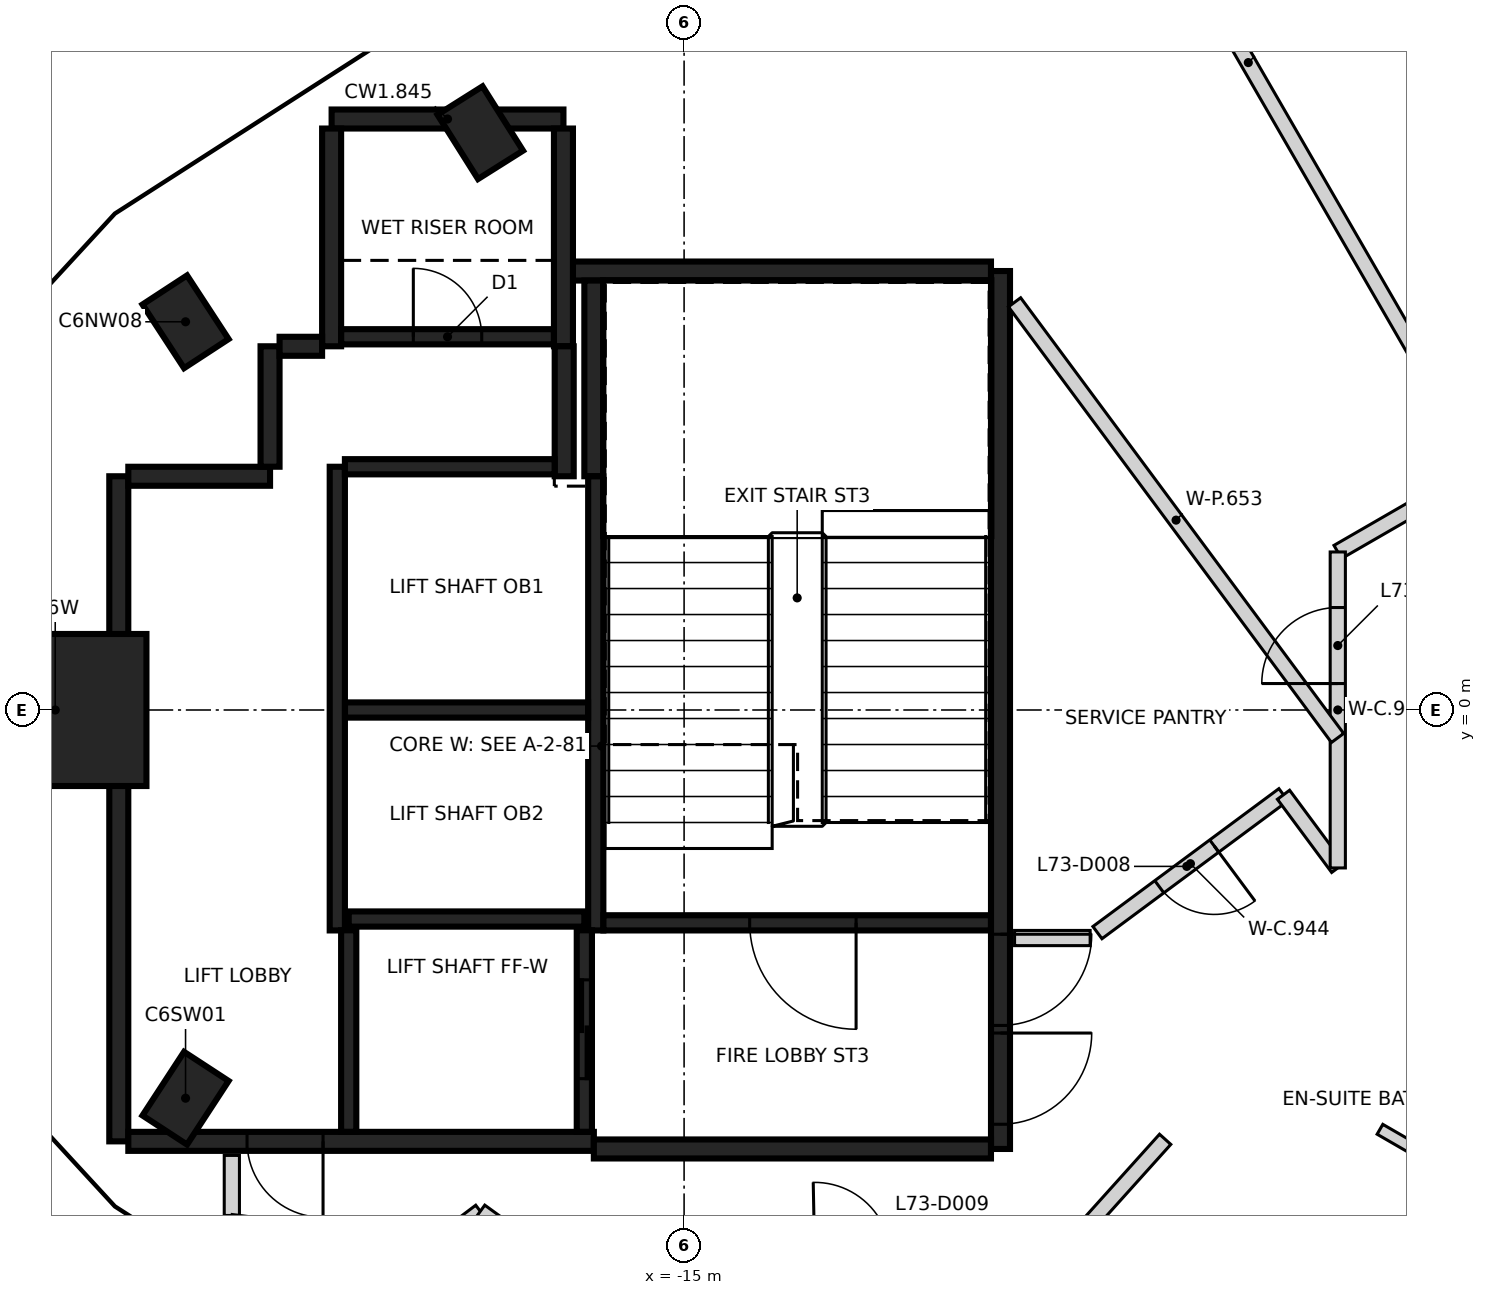
"""IFC4 building model, lengths in metres.
Left out: names, types, materials, properties, quantities, classifications, styles, units other than length and angle.
Written with IfcOpenShell. Run it as: python <this file> out.ifc"""

import sys

from ifc_helpers import new_model, si_unit, direction, frame, frame_2d, origin, origin_2d, place, context, subcontext, project, spatial, rectangle, extrude, element, fill, save


model = new_model("IFC4")
c1 = context("Model", 3, precision=1e-05, world=origin(), true_north=direction((0.0, 1.0)))
c2 = subcontext(c1, "Body", "Model", "MODEL_VIEW")
j1 = project(units=[si_unit("LENGTHUNIT", "METRE"), si_unit("PLANEANGLEUNIT", "RADIAN")], contexts=[c1])
p1 = place(None, origin())
s1 = spatial("IfcSite", under=j1, at=p1, CompositionType="ELEMENT")
p2 = place(p1, origin())
s2 = spatial("IfcBuilding", under=s1, at=p2, CompositionType="ELEMENT")
p3 = place(p2, frame((0.0, 0.0, 291.0)))
s3 = spatial("IfcBuildingStorey", under=s2, at=p3, CompositionType="ELEMENT", Elevation=291.0)
for number, where, z_axis, x_axis in (
    (1, (-17.681, 7.595, -0.35), (0.0, 0.0, 1.0), (-0.533, 0.846, 0.0)),
    (2, (-21.559, 5.107, -0.35), (0.0, 0.0, 1.0), (-0.547, 0.837, 0.0)),
    (3, (-21.559, -5.107, -0.35), (0.0, 0.0, 1.0), (0.547, 0.837, 0.0)),
):
    element("IfcColumn", number, at=place(p3, frame(where, z_axis=z_axis, x_axis=x_axis)), inside=s3, PredefinedType="COLUMN", context=c2, shape_type="SweptSolid", body=[
        extrude(rectangle(XDim=1.0, YDim=0.7, at=origin_2d()), origin(), (0.0, 0.0, 1.0), 3.6),
    ])
p4 = place(p3, frame((-23.273, 0.0, -0.35), z_axis=(0.0, 0.0, 1.0), x_axis=(1.0, 0.0, 0.0)))
e4 = element("IfcColumn", 4, at=p4, inside=s3, PredefinedType="COLUMN", context=c2, shape_type="SweptSolid", body=[
    extrude(rectangle(XDim=2.4, YDim=2.0, at=origin_2d()), origin(), (0.0, 0.0, 1.0), 3.6),
])
p5 = place(p3, frame((-10.837, 5.775, 0.0), z_axis=(0.0, 0.0, 1.0), x_axis=(0.0, -1.0, 0.0)))
e5 = element("IfcWall", 5, at=p5, inside=s3, PredefinedType="SHEAR", context=c2, shape_type="SweptSolid", body=[
    extrude(rectangle(XDim=11.55, YDim=0.25, at=frame_2d((5.775, 0.0))), origin(), (0.0, 0.0, 1.0), 3.25),
])
p6 = place(p5, frame((10.025, 0.0, 0.0)))
e6 = element("IfcOpeningElement", 6, at=p6, cuts=e5, PredefinedType="OPENING", context=c2, shape_type="SweptSolid", body=[
    extrude(rectangle(XDim=1.2, YDim=2.1, at=frame_2d((0.6, 1.05))), frame((0.0, 0.135, 0.0), z_axis=(0.0, -1.0, 0.0), x_axis=(1.0, 0.0, 0.0)), (0.0, 0.0, 1.0), 0.27),
])
p7 = place(p5, frame((8.725, 0.0, 0.0)))
e7 = element("IfcOpeningElement", 7, at=p7, cuts=e5, PredefinedType="OPENING", context=c2, shape_type="SweptSolid", body=[
    extrude(rectangle(XDim=1.2, YDim=2.1, at=frame_2d((0.6, 1.05))), frame((0.0, 0.135, 0.0), z_axis=(0.0, -1.0, 0.0), x_axis=(1.0, 0.0, 0.0)), (0.0, 0.0, 1.0), 0.27),
])
p8 = place(p3, frame((-22.437, -5.675, 0.0), z_axis=(0.0, 0.0, 1.0), x_axis=(0.0, 1.0, 0.0)))
e8 = element("IfcWall", 8, at=p8, inside=s3, PredefinedType="SHEAR", context=c2, shape_type="SweptSolid", body=[
    extrude(rectangle(XDim=8.75, YDim=0.25, at=frame_2d((4.375, 0.0))), origin(), (0.0, 0.0, 1.0), 3.25),
])
p9 = place(p3, frame((-16.187, -5.675, 0.0), z_axis=(0.0, 0.0, 1.0), x_axis=(-1.0, 0.0, 0.0)))
e9 = element("IfcWall", 9, at=p9, inside=s3, PredefinedType="SHEAR", context=c2, shape_type="SweptSolid", body=[
    extrude(rectangle(XDim=6.125, YDim=0.25, at=frame_2d((3.062, 0.0))), origin(), (0.0, 0.0, 1.0), 3.25),
])
p10 = place(p9, frame((3.563, 0.0, 0.0)))
e10 = element("IfcOpeningElement", 10, at=p10, cuts=e9, PredefinedType="OPENING", context=c2, shape_type="SweptSolid", body=[
    extrude(rectangle(XDim=1.0, YDim=2.1, at=frame_2d((0.5, 1.05))), frame((0.0, 0.135, 0.0), z_axis=(0.0, -1.0, 0.0), x_axis=(1.0, 0.0, 0.0)), (0.0, 0.0, 1.0), 0.27),
])
p11 = place(p3, frame((-10.963, -5.775, 0.0), z_axis=(0.0, 0.0, 1.0), x_axis=(-1.0, 0.0, 0.0)))
e11 = element("IfcWall", 11, at=p11, inside=s3, PredefinedType="SHEAR", context=c2, shape_type="SweptSolid", body=[
    extrude(rectangle(XDim=5.225, YDim=0.25, at=frame_2d((2.612, 0.0))), origin(), (0.0, 0.0, 1.0), 3.25),
])
p12 = place(p3, frame((-16.472, 5.775, 0.0), z_axis=(0.0, 0.0, 1.0), x_axis=(1.0, 0.0, 0.0)))
e12 = element("IfcWall", 12, at=p12, inside=s3, PredefinedType="SHEAR", context=c2, shape_type="SweptSolid", body=[
    extrude(rectangle(XDim=5.51, YDim=0.25, at=frame_2d((2.755, 0.0))), origin(), (0.0, 0.0, 1.0), 3.25),
])
p13 = place(p3, frame((-19.637, 7.775, 0.0), z_axis=(0.0, 0.0, 1.0), x_axis=(1.0, 0.0, 0.0)))
e13 = element("IfcWall", 13, at=p13, inside=s3, PredefinedType="SHEAR", context=c2, shape_type="SweptSolid", body=[
    extrude(rectangle(XDim=3.05, YDim=0.25, at=frame_2d((1.525, 0.0))), origin(), (0.0, 0.0, 1.0), 3.25),
])
for number, where, z_axis, x_axis in (
    (14, (-16.587, 7.65, 0.0), (0.0, 0.0, 1.0), (0.0, -1.0, 0.0)),
    (15, (-19.637, 4.785, 0.0), (0.0, 0.0, 1.0), (0.0, 1.0, 0.0)),
):
    element("IfcWall", number, at=place(p3, frame(where, z_axis=z_axis, x_axis=x_axis)), inside=s3, PredefinedType="SHEAR", context=c2, shape_type="SweptSolid", body=[
        extrude(rectangle(XDim=2.865, YDim=0.25, at=frame_2d((1.432, 0.0))), origin(), (0.0, 0.0, 1.0), 3.25),
    ])
p14 = place(p3, frame((-16.187, 3.075, 0.0), z_axis=(0.0, 0.0, 1.0), x_axis=(0.0, 1.0, 0.0)))
e16 = element("IfcWall", 16, at=p14, inside=s3, PredefinedType="SHEAR", context=c2, shape_type="SweptSolid", body=[
    extrude(rectangle(XDim=2.575, YDim=0.25, at=frame_2d((1.287, 0.0))), origin(), (0.0, 0.0, 1.0), 3.25),
])
p15 = place(p3, frame((-22.312, 3.075, 0.0), z_axis=(0.0, 0.0, 1.0), x_axis=(1.0, 0.0, 0.0)))
e17 = element("IfcWall", 17, at=p15, inside=s3, PredefinedType="SHEAR", context=c2, shape_type="SweptSolid", body=[
    extrude(rectangle(XDim=1.865, YDim=0.25, at=frame_2d((0.932, 0.0))), origin(), (0.0, 0.0, 1.0), 3.25),
])
p16 = place(p3, frame((-16.577, 4.785, 0.0), z_axis=(0.0, 0.0, 1.0), x_axis=(0.0, -1.0, 0.0)))
e18 = element("IfcWall", 18, at=p16, inside=s3, PredefinedType="SHEAR", context=c2, shape_type="SweptSolid", body=[
    extrude(rectangle(XDim=1.71, YDim=0.25, at=frame_2d((0.855, 0.0))), origin(), (0.0, 0.0, 1.0), 3.25),
])
p17 = place(p3, frame((-20.447, 3.2, 0.0), z_axis=(0.0, 0.0, 1.0), x_axis=(0.0, 1.0, 0.0)))
e19 = element("IfcWall", 19, at=p17, inside=s3, PredefinedType="SHEAR", context=c2, shape_type="SweptSolid", body=[
    extrude(rectangle(XDim=1.584, YDim=0.25, at=frame_2d((0.792, 0.0))), origin(), (0.0, 0.0, 1.0), 3.25),
])
p18 = place(p3, frame((-20.322, 4.785, 0.0), z_axis=(0.0, 0.0, 1.0), x_axis=(1.0, 0.0, 0.0)))
e20 = element("IfcWall", 20, at=p18, inside=s3, PredefinedType="SHEAR", context=c2, shape_type="SweptSolid", body=[
    extrude(rectangle(XDim=0.559, YDim=0.25, at=frame_2d((0.28, 0.0))), origin(), (0.0, 0.0, 1.0), 3.25),
])
p19 = place(p3, frame((-16.162, 3.074, 0.0), z_axis=(0.0, 0.0, 1.0), x_axis=(0.0, -1.0, 0.0)))
e21 = element("IfcWall", 21, at=p19, inside=s3, PredefinedType="SHEAR", context=c2, shape_type="SweptSolid", body=[
    extrude(rectangle(XDim=5.974, YDim=0.2, at=frame_2d((2.987, 0.0))), origin(), (0.0, 0.0, 1.0), 3.25),
])
p20 = place(p3, frame((-19.562, -2.9, 0.0), z_axis=(0.0, 0.0, 1.0), x_axis=(0.0, 1.0, 0.0)))
e22 = element("IfcWall", 22, at=p20, inside=s3, PredefinedType="SHEAR", context=c2, shape_type="SweptSolid", body=[
    extrude(rectangle(XDim=6.1, YDim=0.2, at=frame_2d((3.05, 0.0))), origin(), (0.0, 0.0, 1.0), 3.25),
])
p21 = place(p3, frame((-10.963, -2.8, 0.0), z_axis=(0.0, 0.0, 1.0), x_axis=(-1.0, 0.0, 0.0)))
e23 = element("IfcWall", 23, at=p21, inside=s3, PredefinedType="SHEAR", context=c2, shape_type="SweptSolid", body=[
    extrude(rectangle(XDim=5.098, YDim=0.2, at=frame_2d((2.549, 0.0))), origin(), (0.0, 0.0, 1.0), 3.25),
])
p22 = place(p21, frame((1.774, 0.0, 0.0)))
e24 = element("IfcOpeningElement", 24, at=p22, cuts=e23, PredefinedType="OPENING", context=c2, shape_type="SweptSolid", body=[
    extrude(rectangle(XDim=1.4, YDim=2.1, at=frame_2d((0.7, 1.05))), frame((0.0, 0.11, 0.0), z_axis=(0.0, -1.0, 0.0), x_axis=(1.0, 0.0, 0.0)), (0.0, 0.0, 1.0), 0.22),
])
p23 = place(p3, frame((-16.263, 0.0, 0.0), z_axis=(0.0, 0.0, 1.0), x_axis=(-1.0, 0.0, 0.0)))
e25 = element("IfcWall", 25, at=p23, inside=s3, PredefinedType="SHEAR", context=c2, shape_type="SweptSolid", body=[
    extrude(rectangle(XDim=3.198, YDim=0.2, at=frame_2d((1.599, 0.0))), origin(), (0.0, 0.0, 1.0), 3.25),
])
p24 = place(p3, frame((-19.511, 4.91, 0.0), z_axis=(0.0, 0.0, 1.0), x_axis=(1.0, 0.0, 0.0)))
e26 = element("IfcWall", 26, at=p24, inside=s3, PredefinedType="SHEAR", context=c2, shape_type="SweptSolid", body=[
    extrude(rectangle(XDim=2.798, YDim=0.2, at=frame_2d((1.399, 0.0))), origin(), (0.0, 0.0, 1.0), 3.25),
])
p25 = place(p24, frame((0.949, 0.0, 0.0)))
e27 = element("IfcOpeningElement", 27, at=p25, cuts=e26, PredefinedType="OPENING", context=c2, shape_type="SweptSolid", body=[
    extrude(rectangle(XDim=0.9, YDim=2.1, at=frame_2d((0.45, 1.05))), frame((0.0, 0.11, 0.0), z_axis=(0.0, -1.0, 0.0), x_axis=(1.0, 0.0, 0.0)), (0.0, 0.0, 1.0), 0.22),
])
p26 = place(p3, frame((-19.462, 3.2, 0.0), z_axis=(0.0, 0.0, 1.0), x_axis=(1.0, 0.0, 0.0)))
e28 = element("IfcWall", 28, at=p26, inside=s3, PredefinedType="SHEAR", context=c2, shape_type="SweptSolid", body=[
    extrude(rectangle(XDim=2.759, YDim=0.2, at=frame_2d((1.379, 0.0))), origin(), (0.0, 0.0, 1.0), 3.25),
])
p27 = place(p3, frame((-19.412, -2.75, 0.0), z_axis=(0.0, 0.0, 1.0), x_axis=(1.0, 0.0, 0.0)))
e29 = element("IfcWall", 29, at=p27, inside=s3, PredefinedType="SHEAR", context=c2, shape_type="SweptSolid", body=[
    extrude(rectangle(XDim=3.1, YDim=0.2, at=frame_2d((1.55, 0.0))), origin(), (0.0, 0.0, 1.0), 3.25),
])
p28 = place(p3, frame((-16.312, -2.898, 0.0), z_axis=(0.0, 0.0, 1.0), x_axis=(0.0, -1.0, 0.0)))
e30 = element("IfcWall", 30, at=p28, inside=s3, PredefinedType="SHEAR", context=c2, shape_type="SweptSolid", body=[
    extrude(rectangle(XDim=2.651, YDim=0.2, at=frame_2d((1.325, 0.0))), origin(), (0.0, 0.0, 1.0), 3.25),
])
p29 = place(p28, frame((0.652, 0.0, 0.0)))
e31 = element("IfcOpeningElement", 31, at=p29, cuts=e30, PredefinedType="OPENING", context=c2, shape_type="SweptSolid", body=[
    extrude(rectangle(XDim=1.3, YDim=2.1, at=frame_2d((0.65, 1.05))), frame((0.0, 0.11, 0.0), z_axis=(0.0, -1.0, 0.0), x_axis=(1.0, 0.0, 0.0)), (0.0, 0.0, 1.0), 0.22),
])
p30 = place(p3, frame((-19.412, -5.549, 0.0), z_axis=(0.0, 0.0, 1.0), x_axis=(0.0, 1.0, 0.0)))
e32 = element("IfcWall", 32, at=p30, inside=s3, PredefinedType="SHEAR", context=c2, shape_type="SweptSolid", body=[
    extrude(rectangle(XDim=2.651, YDim=0.2, at=frame_2d((1.325, 0.0))), origin(), (0.0, 0.0, 1.0), 3.25),
])
p31 = place(p3, frame((-20.95, -6.65, 0.0), z_axis=(0.0, 0.0, 1.0), x_axis=(0.0, 1.0, 0.0)))
e33 = element("IfcWall", 33, at=p31, inside=s3, PredefinedType="PARTITIONING", context=c2, shape_type="SweptSolid", body=[
    extrude(rectangle(XDim=0.79, YDim=0.2, at=frame_2d((0.395, 0.0))), origin(), (0.0, 0.0, 1.0), 3.25),
])
p32 = place(p3, frame((-20.929, -7.305, 0.0), z_axis=(0.0, 0.0, 1.0), x_axis=(0.125718385971, 0.992065969293, 0.0)))
e34 = element("IfcWall", 34, at=p32, inside=s3, PredefinedType="PARTITIONING", context=c2, shape_type="SweptSolid", body=[
    extrude(rectangle(XDim=0.66, YDim=0.2, at=frame_2d((0.33, 0.0))), origin(), (0.0, 0.0, 1.0), 3.25),
])
p33 = place(p3, frame((-18.642, -7.319, 0.0), z_axis=(0.0, 0.0, 1.0), x_axis=(0.798707882989, 0.601718968998, 0.0)))
e35 = element("IfcWall", 35, at=p33, inside=s3, PredefinedType="PARTITIONING", context=c2, shape_type="SweptSolid", body=[
    extrude(rectangle(XDim=1.203, YDim=0.2, at=frame_2d((0.602, 0.0))), origin(), (0.0, 0.0, 1.0), 2.35),
])
p34 = place(p3, frame((-17.681, -6.595, 0.0), z_axis=(0.0, 0.0, 1.0), x_axis=(0.810123213102, -0.586259652026, 0.0)))
e36 = element("IfcWall", 36, at=p34, inside=s3, PredefinedType="PARTITIONING", context=c2, shape_type="SweptSolid", body=[
    extrude(rectangle(XDim=1.17, YDim=0.2, at=frame_2d((0.585, 0.0))), origin(), (0.0, 0.0, 1.0), 3.25),
])
p35 = place(p3, frame((-10.652, -3.0, 0.0), z_axis=(0.0, 0.0, 1.0), x_axis=(1.0, 0.0, 0.0)))
e37 = element("IfcWall", 37, at=p35, inside=s3, PredefinedType="PARTITIONING", context=c2, shape_type="SweptSolid", body=[
    extrude(rectangle(XDim=0.994, YDim=0.2, at=frame_2d((0.497, 0.0))), origin(), (0.0, 0.0, 1.0), 3.25),
])
p36 = place(p3, frame((-10.023, -7.151, 0.0), z_axis=(0.0, 0.0, 1.0), x_axis=(0.668804583793, 0.743438248073, 0.0)))
e38 = element("IfcWall", 38, at=p36, inside=s3, PredefinedType="PARTITIONING", context=c2, shape_type="SweptSolid", body=[
    extrude(rectangle(XDim=2.021, YDim=0.2, at=frame_2d((1.011, 0.0))), origin(), (0.0, 0.0, 1.0), 3.25),
])
p37 = place(p3, frame((-7.115, -1.115, 0.0), z_axis=(0.0, 0.0, 1.0), x_axis=(-0.803344165632, -0.595515030495, 0.0)))
e39 = element("IfcWall", 39, at=p37, inside=s3, PredefinedType="PARTITIONING", context=c2, shape_type="SweptSolid", body=[
    extrude(rectangle(XDim=3.046, YDim=0.2, at=frame_2d((1.523, 0.0))), origin(), (0.0, 0.0, 1.0), 3.25),
])
p38 = place(p37, frame((1.133, 0.0, 0.0)))
e40 = element("IfcOpeningElement", 40, at=p38, cuts=e39, PredefinedType="OPENING", context=c2, shape_type="SweptSolid", body=[
    extrude(rectangle(XDim=0.9, YDim=2.1, at=frame_2d((0.45, 1.05))), frame((0.0, 0.11, 0.0), z_axis=(0.0, -1.0, 0.0), x_axis=(1.0, 0.0, 0.0)), (0.0, 0.0, 1.0), 0.22),
])
p39 = place(p3, frame((-7.114, -1.115, 0.0), z_axis=(0.0, 0.0, 1.0), x_axis=(0.595690139668, -0.803214328496, 0.0)))
e41 = element("IfcWall", 41, at=p39, inside=s3, PredefinedType="PARTITIONING", context=c2, shape_type="SweptSolid", body=[
    extrude(rectangle(XDim=1.199, YDim=0.2, at=frame_2d((0.599, 0.0))), origin(), (0.0, 0.0, 1.0), 3.25),
])
p40 = place(p3, frame((-6.4, 2.079, 0.0), z_axis=(0.0, 0.0, 1.0), x_axis=(0.866037708501, 0.499978687001, 0.0)))
e42 = element("IfcWall", 42, at=p40, inside=s3, PredefinedType="PARTITIONING", context=c2, shape_type="SweptSolid", body=[
    extrude(rectangle(XDim=6.818, YDim=0.2, at=frame_2d((3.409, 0.0))), origin(), (0.0, 0.0, 1.0), 3.25),
])
p41 = place(p40, frame((4.003, 0.0, 0.0)))
e43 = element("IfcOpeningElement", 43, at=p41, cuts=e42, PredefinedType="OPENING", context=c2, shape_type="SweptSolid", body=[
    extrude(rectangle(XDim=1.0, YDim=2.1, at=frame_2d((0.5, 1.05))), frame((0.0, 0.11, 0.0), z_axis=(0.0, -1.0, 0.0), x_axis=(1.0, 0.0, 0.0)), (0.0, 0.0, 1.0), 0.22),
])
p42 = place(p3, frame((-6.4, -2.078, 0.0), z_axis=(0.0, 0.0, 1.0), x_axis=(0.0, 1.0, 0.0)))
e44 = element("IfcWall", 44, at=p42, inside=s3, PredefinedType="PARTITIONING", context=c2, shape_type="SweptSolid", body=[
    extrude(rectangle(XDim=4.157, YDim=0.2, at=frame_2d((2.079, 0.0))), origin(), (0.0, 0.0, 1.0), 3.25),
])
p43 = place(p42, frame((2.426, 0.0, 0.0)))
e45 = element("IfcOpeningElement", 45, at=p43, cuts=e44, PredefinedType="OPENING", context=c2, shape_type="SweptSolid", body=[
    extrude(rectangle(XDim=1.0, YDim=2.1, at=frame_2d((0.5, 1.05))), frame((0.0, 0.11, 0.0), z_axis=(0.0, -1.0, 0.0), x_axis=(1.0, 0.0, 0.0)), (0.0, 0.0, 1.0), 0.22),
])
p44 = place(p3, frame((-10.652, 5.364, 0.0), z_axis=(0.0, 0.0, 1.0), x_axis=(0.595550732464, -0.803317698711, 0.0)))
e46 = element("IfcWall", 46, at=p44, inside=s3, PredefinedType="PARTITIONING", context=c2, shape_type="SweptSolid", body=[
    extrude(rectangle(XDim=7.135, YDim=0.2, at=frame_2d((3.567, 0.0))), origin(), (0.0, 0.0, 1.0), 3.25),
])
p45 = place(p3, frame((-10.659, 13.856, 0.0), z_axis=(0.0, 0.0, 1.0), x_axis=(0.500004723409, -0.866022676706, 0.0)))
e47 = element("IfcWall", 47, at=p45, inside=s3, PredefinedType="PARTITIONING", context=c2, shape_type="SweptSolid", body=[
    extrude(rectangle(XDim=12.329, YDim=0.2, at=frame_2d((6.164, 0.0))), origin(), (0.0, 0.0, 1.0), 3.25),
])
p46 = place(p3, frame((-6.67, -16.159, 0.0), z_axis=(0.0, 0.0, 1.0), x_axis=(0.500017276951, 0.866015428702, 0.0)))
e48 = element("IfcWall", 48, at=p46, inside=s3, PredefinedType="PARTITIONING", context=c2, shape_type="SweptSolid", body=[
    extrude(rectangle(XDim=12.329, YDim=0.2, at=frame_2d((6.165, 0.0))), origin(), (0.0, 0.0, 1.0), 3.25),
])
p47 = place(p3, frame((-5.845, -5.516, 0.0), z_axis=(0.0, 0.0, 1.0), x_axis=(0.865972526687, -0.500091574638, 0.0)))
e49 = element("IfcWall", 49, at=p47, inside=s3, PredefinedType="PARTITIONING", context=c2, shape_type="SweptSolid", body=[
    extrude(rectangle(XDim=2.099, YDim=0.15, at=frame_2d((1.05, 0.0))), origin(), (0.0, 0.0, 1.0), 3.25),
])
p48 = place(p29, origin())
e50 = element("IfcDoor", 50, at=p48, inside=s3, OperationType="SLIDING_TO_LEFT", PredefinedType="DOOR", context=c2, shape_type="SweptSolid", body=[
    extrude(rectangle(XDim=1.3, YDim=2.1, at=frame_2d((0.65, 1.05))), frame((0.0, 0.025, 0.0), z_axis=(0.0, -1.0, 0.0), x_axis=(1.0, 0.0, 0.0)), (0.0, 0.0, 1.0), 0.05),
])
fill(e31, e50)
p49 = place(p10, origin())
e51 = element("IfcDoor", 51, at=p49, inside=s3, OperationType="SINGLE_SWING_LEFT", PredefinedType="DOOR", context=c2, shape_type="SweptSolid", body=[
    extrude(rectangle(XDim=1.0, YDim=2.1, at=frame_2d((0.5, 1.05))), frame((0.0, 0.025, 0.0), z_axis=(0.0, -1.0, 0.0), x_axis=(1.0, 0.0, 0.0)), (0.0, 0.0, 1.0), 0.05),
])
fill(e10, e51)
p50 = place(p6, origin())
e52 = element("IfcDoor", 52, at=p50, inside=s3, OperationType="SINGLE_SWING_LEFT", PredefinedType="DOOR", context=c2, shape_type="SweptSolid", body=[
    extrude(rectangle(XDim=1.2, YDim=2.1, at=frame_2d((0.6, 1.05))), frame((0.0, 0.025, 0.0), z_axis=(0.0, -1.0, 0.0), x_axis=(1.0, 0.0, 0.0)), (0.0, 0.0, 1.0), 0.05),
])
fill(e6, e52)
p51 = place(p7, origin())
e53 = element("IfcDoor", 53, at=p51, inside=s3, OperationType="SINGLE_SWING_RIGHT", PredefinedType="DOOR", context=c2, shape_type="SweptSolid", body=[
    extrude(rectangle(XDim=1.2, YDim=2.1, at=frame_2d((0.6, 1.05))), frame((0.0, 0.025, 0.0), z_axis=(0.0, -1.0, 0.0), x_axis=(1.0, 0.0, 0.0)), (0.0, 0.0, 1.0), 0.05),
])
fill(e7, e53)
p52 = place(p22, origin())
e54 = element("IfcDoor", 54, at=p52, inside=s3, OperationType="SINGLE_SWING_LEFT", PredefinedType="DOOR", context=c2, shape_type="SweptSolid", body=[
    extrude(rectangle(XDim=1.4, YDim=2.1, at=frame_2d((0.7, 1.05))), frame((0.0, 0.025, 0.0), z_axis=(0.0, -1.0, 0.0), x_axis=(1.0, 0.0, 0.0)), (0.0, 0.0, 1.0), 0.05),
])
fill(e24, e54)
p53 = place(p25, origin())
e55 = element("IfcDoor", 55, at=p53, inside=s3, OperationType="SINGLE_SWING_RIGHT", PredefinedType="DOOR", context=c2, shape_type="SweptSolid", body=[
    extrude(rectangle(XDim=0.9, YDim=2.1, at=frame_2d((0.45, 1.05))), frame((0.0, 0.025, 0.0), z_axis=(0.0, -1.0, 0.0), x_axis=(1.0, 0.0, 0.0)), (0.0, 0.0, 1.0), 0.05),
])
fill(e27, e55)
p54 = place(p43, origin())
e56 = element("IfcDoor", 56, at=p54, inside=s3, OperationType="SINGLE_SWING_LEFT", PredefinedType="DOOR", context=c2, shape_type="SweptSolid", body=[
    extrude(rectangle(XDim=1.0, YDim=2.1, at=frame_2d((0.5, 1.05))), frame((0.0, 0.025, 0.0), z_axis=(0.0, -1.0, 0.0), x_axis=(1.0, 0.0, 0.0)), (0.0, 0.0, 1.0), 0.05),
])
fill(e45, e56)
p55 = place(p38, origin())
e57 = element("IfcDoor", 57, at=p55, inside=s3, OperationType="SINGLE_SWING_LEFT", PredefinedType="DOOR", context=c2, shape_type="SweptSolid", body=[
    extrude(rectangle(XDim=0.9, YDim=2.1, at=frame_2d((0.45, 1.05))), frame((0.0, 0.025, 0.0), z_axis=(0.0, -1.0, 0.0), x_axis=(1.0, 0.0, 0.0)), (0.0, 0.0, 1.0), 0.05),
])
fill(e40, e57)
save(model, sys.argv[1])
